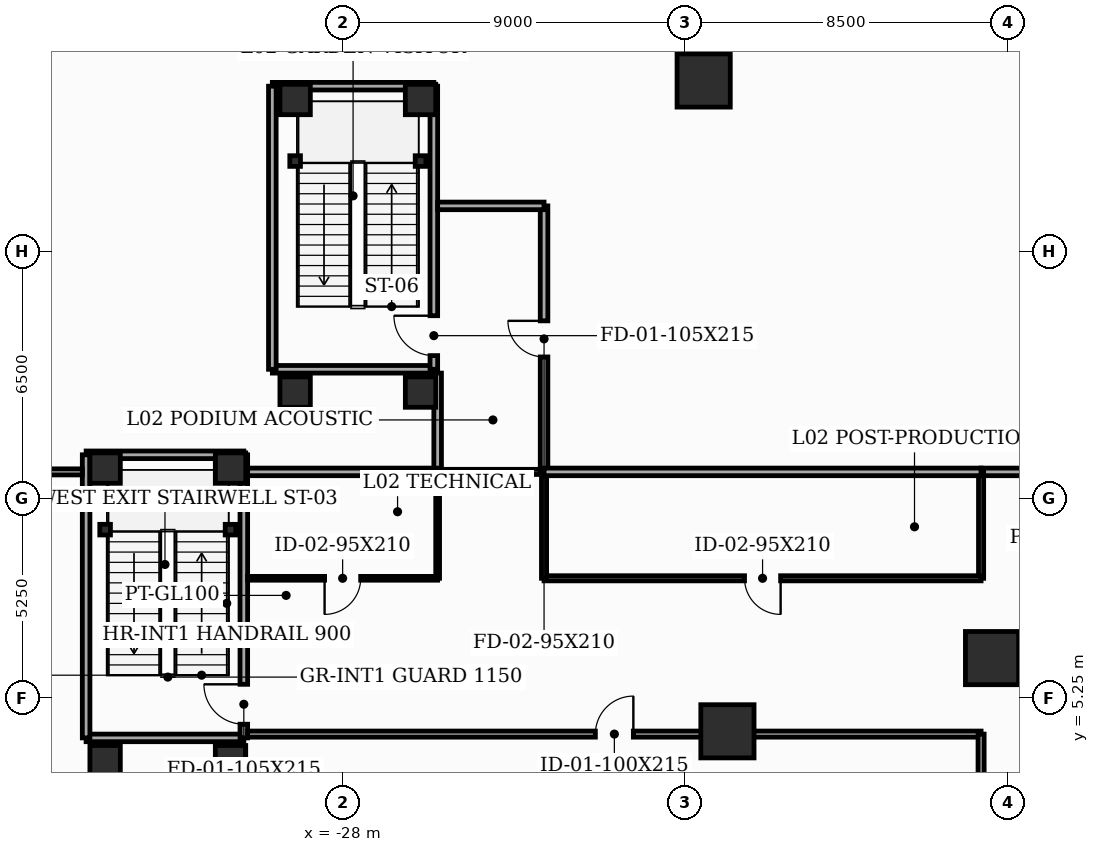
"""IFC4 building model, lengths in metres.
Left out: names, types, materials, properties, quantities, classifications, styles, units other than length and angle.
Written with IfcOpenShell. Run it as: python <this file> out.ifc"""

import sys

from ifc_helpers import new_model, si_unit, direction, frame, frame_2d, origin, origin_2d, place, context, subcontext, project, spatial, rectangle, i_section, extrude, element, fill, save


model = new_model("IFC4")
c1 = context("Model", 3, precision=1e-05, world=origin(), true_north=direction((0.0, 1.0)))
c2 = subcontext(c1, "Body", "Model", "MODEL_VIEW")
j1 = project(units=[si_unit("LENGTHUNIT", "METRE"), si_unit("PLANEANGLEUNIT", "RADIAN")], contexts=[c1])
p1 = place(None, origin())
s1 = spatial("IfcSite", under=j1, at=p1, CompositionType="ELEMENT")
p2 = place(p1, origin())
s2 = spatial("IfcBuilding", under=s1, at=p2, CompositionType="ELEMENT")
p3 = place(p2, frame((0.0, 0.0, 10.4)))
s3 = spatial("IfcBuildingStorey", under=s2, at=p3, CompositionType="ELEMENT", Elevation=10.4)
for number, where, z_axis, x_axis in (
    (1, (-10.912, 6.3, 0.0), (0.0, 0.0, 1.0), (1.0, 0.0, 0.0)),
    (2, (-18.5, 21.5, 0.0), (0.0, 0.0, 1.0), (1.0, 0.0, 0.0)),
    (3, (-17.875, 4.373, 0.0), (0.0, 0.0, 1.0), (1.0, 0.0, 0.0)),
):
    element("IfcColumn", number, at=place(p3, frame(where, z_axis=z_axis, x_axis=x_axis)), inside=s3, PredefinedType="COLUMN", context=c2, shape_type="SweptSolid", body=[
        extrude(rectangle(XDim=1.4, YDim=1.4, at=origin_2d()), origin(), (0.0, 0.0, 1.0), 5.2),
    ])
for number, where, z_axis, x_axis in (
    (4, (-34.25, 3.6, 0.0), (0.0, 0.0, 1.0), (1.0, 0.0, 0.0)),
    (5, (-30.95, 3.6, 0.0), (0.0, 0.0, 1.0), (1.0, 0.0, 0.0)),
    (6, (-30.95, 11.3, 0.0), (0.0, 0.0, 1.0), (1.0, 0.0, 0.0)),
    (7, (-34.25, 11.3, 0.0), (0.0, 0.0, 1.0), (1.0, 0.0, 0.0)),
):
    element("IfcColumn", number, at=place(p3, frame(where, z_axis=z_axis, x_axis=x_axis)), inside=s3, PredefinedType="COLUMN", context=c2, shape_type="SweptSolid", body=[
        extrude(rectangle(XDim=0.8, YDim=0.8, at=origin_2d()), origin(), (0.0, 0.0, 1.0), 5.2),
    ])
for number, where, z_axis, x_axis in (
    (8, (-34.25, 9.68, 0.0), (0.0, 0.0, 1.0), (1.0, 0.0, 0.0)),
    (9, (-30.95, 9.68, 0.0), (0.0, 0.0, 1.0), (1.0, 0.0, 0.0)),
):
    element("IfcColumn", number, at=place(p3, frame(where, z_axis=z_axis, x_axis=x_axis)), inside=s3, PredefinedType="PILASTER", context=c2, shape_type="SweptSolid", body=[
        extrude(i_section(OverallWidth=0.28, OverallDepth=0.28, WebThickness=0.01, FlangeThickness=0.018, at=origin_2d()), origin(), (0.0, 0.0, 1.0), 5.2),
    ])
for number, where, z_axis, x_axis in (
    (10, (-29.25, 13.3, 0.0), (0.0, 0.0, 1.0), (1.0, 0.0, 0.0)),
    (11, (-25.95, 13.3, 0.0), (0.0, 0.0, 1.0), (1.0, 0.0, 0.0)),
    (12, (-25.95, 21.0, 0.0), (0.0, 0.0, 1.0), (1.0, 0.0, 0.0)),
    (13, (-29.25, 21.0, 0.0), (0.0, 0.0, 1.0), (1.0, 0.0, 0.0)),
):
    element("IfcColumn", number, at=place(p3, frame(where, z_axis=z_axis, x_axis=x_axis)), inside=s3, PredefinedType="COLUMN", context=c2, shape_type="SweptSolid", body=[
        extrude(rectangle(XDim=0.8, YDim=0.8, at=origin_2d()), origin(), (0.0, 0.0, 1.0), 5.2),
    ])
for number, where, z_axis, x_axis in (
    (14, (-29.25, 19.38, 0.0), (0.0, 0.0, 1.0), (1.0, 0.0, 0.0)),
    (15, (-25.95, 19.38, 0.0), (0.0, 0.0, 1.0), (1.0, 0.0, 0.0)),
):
    element("IfcColumn", number, at=place(p3, frame(where, z_axis=z_axis, x_axis=x_axis)), inside=s3, PredefinedType="PILASTER", context=c2, shape_type="SweptSolid", body=[
        extrude(i_section(OverallWidth=0.28, OverallDepth=0.28, WebThickness=0.01, FlangeThickness=0.018, at=origin_2d()), origin(), (0.0, 0.0, 1.0), 5.2),
    ])
p4 = place(p3, frame((-34.75, 4.2, 0.0), z_axis=(0.0, 0.0, 1.0), x_axis=(1.0, 0.0, 0.0)))
e16 = element("IfcWall", 16, at=p4, inside=s3, PredefinedType="SOLIDWALL", context=c2, shape_type="SweptSolid", body=[
    extrude(rectangle(XDim=4.15, YDim=0.2, at=frame_2d((2.075, 0.0))), origin(), (0.0, 0.0, 1.0), 4.95),
])
p5 = place(p3, frame((-30.6, 4.2, 0.0), z_axis=(0.0, 0.0, 1.0), x_axis=(0.0, 1.0, 0.0)))
e17 = element("IfcWall", 17, at=p5, inside=s3, PredefinedType="SOLIDWALL", context=c2, shape_type="SweptSolid", body=[
    extrude(rectangle(XDim=7.45, YDim=0.2, at=frame_2d((3.725, 0.0))), origin(), (0.0, 0.0, 1.0), 4.95),
])
p6 = place(p5, frame((0.36, 0.0, 0.0)))
e18 = element("IfcOpeningElement", 18, at=p6, cuts=e17, PredefinedType="OPENING", context=c2, shape_type="SweptSolid", body=[
    extrude(rectangle(XDim=1.05, YDim=2.15, at=frame_2d((0.525, 1.075))), frame((0.0, 0.11, 0.0), z_axis=(0.0, -1.0, 0.0), x_axis=(1.0, 0.0, 0.0)), (0.0, 0.0, 1.0), 0.22),
])
p7 = place(p3, frame((-30.6, 11.65, 0.0), z_axis=(0.0, 0.0, 1.0), x_axis=(-1.0, 0.0, 0.0)))
e19 = element("IfcWall", 19, at=p7, inside=s3, PredefinedType="SOLIDWALL", context=c2, shape_type="SweptSolid", body=[
    extrude(rectangle(XDim=4.15, YDim=0.2, at=frame_2d((2.075, 0.0))), origin(), (0.0, 0.0, 1.0), 4.95),
])
p8 = place(p3, frame((-34.75, 11.65, 0.0), z_axis=(0.0, 0.0, 1.0), x_axis=(0.0, -1.0, 0.0)))
e20 = element("IfcWall", 20, at=p8, inside=s3, PredefinedType="SOLIDWALL", context=c2, shape_type="SweptSolid", body=[
    extrude(rectangle(XDim=7.45, YDim=0.2, at=frame_2d((3.725, 0.0))), origin(), (0.0, 0.0, 1.0), 4.95),
])
p9 = place(p3, frame((-29.85, 13.9, 0.0), z_axis=(0.0, 0.0, 1.0), x_axis=(1.0, 0.0, 0.0)))
e21 = element("IfcWall", 21, at=p9, inside=s3, PredefinedType="SOLIDWALL", context=c2, shape_type="SweptSolid", body=[
    extrude(rectangle(XDim=4.25, YDim=0.2, at=frame_2d((2.125, 0.0))), origin(), (0.0, 0.0, 1.0), 4.435),
])
p10 = place(p3, frame((-25.6, 13.9, 0.0), z_axis=(0.0, 0.0, 1.0), x_axis=(0.0, 1.0, 0.0)))
e22 = element("IfcWall", 22, at=p10, inside=s3, PredefinedType="SOLIDWALL", context=c2, shape_type="SweptSolid", body=[
    extrude(rectangle(XDim=7.45, YDim=0.2, at=frame_2d((3.725, 0.0))), origin(), (0.0, 0.0, 1.0), 4.435),
])
p11 = place(p10, frame((0.36, 0.0, 0.0)))
e23 = element("IfcOpeningElement", 23, at=p11, cuts=e22, PredefinedType="OPENING", context=c2, shape_type="SweptSolid", body=[
    extrude(rectangle(XDim=1.05, YDim=2.15, at=frame_2d((0.525, 1.075))), frame((0.0, 0.11, 0.0), z_axis=(0.0, -1.0, 0.0), x_axis=(1.0, 0.0, 0.0)), (0.0, 0.0, 1.0), 0.22),
])
p12 = place(p3, frame((-25.6, 21.35, 0.0), z_axis=(0.0, 0.0, 1.0), x_axis=(-1.0, 0.0, 0.0)))
e24 = element("IfcWall", 24, at=p12, inside=s3, PredefinedType="SOLIDWALL", context=c2, shape_type="SweptSolid", body=[
    extrude(rectangle(XDim=4.25, YDim=0.2, at=frame_2d((2.125, 0.0))), origin(), (0.0, 0.0, 1.0), 4.95),
])
p13 = place(p3, frame((-29.85, 21.35, 0.0), z_axis=(0.0, 0.0, 1.0), x_axis=(0.0, -1.0, 0.0)))
e25 = element("IfcWall", 25, at=p13, inside=s3, PredefinedType="SOLIDWALL", context=c2, shape_type="SweptSolid", body=[
    extrude(rectangle(XDim=7.45, YDim=0.2, at=frame_2d((3.725, 0.0))), origin(), (0.0, 0.0, 1.0), 4.435),
])
p14 = place(p3, frame((-22.7, 11.2, 0.0), z_axis=(0.0, 0.0, 1.0), x_axis=(-1.0, 0.0, 0.0)))
e26 = element("IfcWall", 26, at=p14, inside=s3, PredefinedType="PARTITIONING", context=c2, shape_type="SweptSolid", body=[
    extrude(rectangle(XDim=2.8, YDim=0.135, at=frame_2d((1.4, 0.0))), origin(), (0.0, 0.0, 1.0), 4.95),
])
p15 = place(p3, frame((-30.5, 4.3, 0.0), z_axis=(0.0, 0.0, 1.0), x_axis=(1.0, 0.0, 0.0)))
e27 = element("IfcWall", 27, at=p15, inside=s3, PredefinedType="PARTITIONING", context=c2, shape_type="SweptSolid", body=[
    extrude(rectangle(XDim=19.3, YDim=0.16, at=frame_2d((9.65, 0.0))), origin(), (0.0, 0.0, 1.0), 3.435),
])
p16 = place(p15, frame((9.15, 0.0, 0.0)))
e28 = element("IfcOpeningElement", 28, at=p16, cuts=e27, PredefinedType="OPENING", context=c2, shape_type="SweptSolid", body=[
    extrude(rectangle(XDim=1.0, YDim=2.15, at=frame_2d((0.5, 1.075))), frame((0.0, 0.09, 0.0), z_axis=(0.0, -1.0, 0.0), x_axis=(1.0, 0.0, 0.0)), (0.0, 0.0, 1.0), 0.18),
])
p17 = place(p3, frame((-11.2, 4.3, 0.0), z_axis=(0.0, 0.0, 1.0), x_axis=(0.0, -1.0, 0.0)))
e29 = element("IfcWall", 29, at=p17, inside=s3, PredefinedType="PARTITIONING", context=c2, shape_type="SweptSolid", body=[
    extrude(rectangle(XDim=7.9, YDim=0.16, at=frame_2d((3.95, 0.0))), origin(), (0.0, 0.0, 1.0), 4.235),
])
p18 = place(p3, frame((-9.0, 11.2, 0.0), z_axis=(0.0, 0.0, 1.0), x_axis=(-1.0, 0.0, 0.0)))
e30 = element("IfcWall", 30, at=p18, inside=s3, PredefinedType="SOLIDWALL", context=c2, shape_type="SweptSolid", body=[
    extrude(rectangle(XDim=2.2, YDim=0.2, at=frame_2d((1.1, 0.0))), origin(), (0.0, 0.0, 1.0), 4.95),
])
p19 = place(p3, frame((-11.2, 11.2, 0.0), z_axis=(0.0, 0.0, 1.0), x_axis=(0.0, -1.0, 0.0)))
e31 = element("IfcWall", 31, at=p19, inside=s3, PredefinedType="PARTITIONING", context=c2, shape_type="SweptSolid", body=[
    extrude(rectangle(XDim=2.8, YDim=0.135, at=frame_2d((1.4, 0.0))), origin(), (0.0, 0.0, 1.0), 4.95),
])
p20 = place(p3, frame((-11.2, 8.4, 0.0), z_axis=(0.0, 0.0, 1.0), x_axis=(-1.0, 0.0, 0.0)))
e32 = element("IfcWall", 32, at=p20, inside=s3, PredefinedType="PARTITIONING", context=c2, shape_type="SweptSolid", body=[
    extrude(rectangle(XDim=11.5, YDim=0.135, at=frame_2d((5.75, 0.0))), origin(), (0.0, 0.0, 1.0), 4.235),
])
p21 = place(p20, frame((5.275, 0.0, 0.0)))
e33 = element("IfcOpeningElement", 33, at=p21, cuts=e32, PredefinedType="OPENING", context=c2, shape_type="SweptSolid", body=[
    extrude(rectangle(XDim=0.95, YDim=2.1, at=frame_2d((0.475, 1.05))), frame((0.0, 0.077, 0.0), z_axis=(0.0, -1.0, 0.0), x_axis=(1.0, 0.0, 0.0)), (0.0, 0.0, 1.0), 0.155),
])
p22 = place(p3, frame((-22.7, 8.4, 0.0), z_axis=(0.0, 0.0, 1.0), x_axis=(0.0, 1.0, 0.0)))
e34 = element("IfcWall", 34, at=p22, inside=s3, PredefinedType="PARTITIONING", context=c2, shape_type="SweptSolid", body=[
    extrude(rectangle(XDim=2.8, YDim=0.135, at=frame_2d((1.4, 0.0))), origin(), (0.0, 0.0, 1.0), 4.95),
])
p23 = place(p3, frame((-25.5, 11.2, 0.0), z_axis=(0.0, 0.0, 1.0), x_axis=(0.0, -1.0, 0.0)))
e35 = element("IfcWall", 35, at=p23, inside=s3, PredefinedType="MOVABLE", context=c2, shape_type="SweptSolid", body=[
    extrude(rectangle(XDim=2.8, YDim=0.1, at=frame_2d((1.4, 0.0))), origin(), (0.0, 0.0, 1.0), 4.95),
])
p24 = place(p3, frame((-25.5, 8.4, 0.0), z_axis=(0.0, 0.0, 1.0), x_axis=(-1.0, 0.0, 0.0)))
e36 = element("IfcWall", 36, at=p24, inside=s3, PredefinedType="MOVABLE", context=c2, shape_type="SweptSolid", body=[
    extrude(rectangle(XDim=5.0, YDim=0.1, at=frame_2d((2.5, 0.0))), origin(), (0.0, 0.0, 1.0), 4.95),
])
p25 = place(p24, frame((2.025, 0.0, 0.0)))
e37 = element("IfcOpeningElement", 37, at=p25, cuts=e36, PredefinedType="OPENING", context=c2, shape_type="SweptSolid", body=[
    extrude(rectangle(XDim=0.95, YDim=2.1, at=frame_2d((0.475, 1.05))), frame((0.0, 0.06, 0.0), z_axis=(0.0, -1.0, 0.0), x_axis=(1.0, 0.0, 0.0)), (0.0, 0.0, 1.0), 0.12),
])
p26 = place(p3, frame((-25.5, 13.8, 0.0), z_axis=(0.0, 0.0, 1.0), x_axis=(0.0, -1.0, 0.0)))
e38 = element("IfcWall", 38, at=p26, inside=s3, PredefinedType="SOLIDWALL", context=c2, shape_type="SweptSolid", body=[
    extrude(rectangle(XDim=2.6, YDim=0.2, at=frame_2d((1.3, 0.0))), origin(), (0.0, 0.0, 1.0), 4.435),
])
p27 = place(p3, frame((-22.7, 11.2, 0.0), z_axis=(0.0, 0.0, 1.0), x_axis=(0.0, 1.0, 0.0)))
e39 = element("IfcWall", 39, at=p27, inside=s3, PredefinedType="SOLIDWALL", context=c2, shape_type="SweptSolid", body=[
    extrude(rectangle(XDim=7.0, YDim=0.2, at=frame_2d((3.5, 0.0))), origin(), (0.0, 0.0, 1.0), 4.435),
])
p28 = place(p27, frame((3.025, 0.0, 0.0)))
e40 = element("IfcOpeningElement", 40, at=p28, cuts=e39, PredefinedType="OPENING", context=c2, shape_type="SweptSolid", body=[
    extrude(rectangle(XDim=0.95, YDim=2.1, at=frame_2d((0.475, 1.05))), frame((0.0, 0.11, 0.0), z_axis=(0.0, -1.0, 0.0), x_axis=(1.0, 0.0, 0.0)), (0.0, 0.0, 1.0), 0.22),
])
p29 = place(p3, frame((-22.7, 18.2, 0.0), z_axis=(0.0, 0.0, 1.0), x_axis=(-1.0, 0.0, 0.0)))
e41 = element("IfcWall", 41, at=p29, inside=s3, PredefinedType="SOLIDWALL", context=c2, shape_type="SweptSolid", body=[
    extrude(rectangle(XDim=2.8, YDim=0.2, at=frame_2d((1.4, 0.0))), origin(), (0.0, 0.0, 1.0), 4.95),
])
p30 = place(p3, frame((-34.85, 11.2, 0.0), z_axis=(0.0, 0.0, 1.0), x_axis=(-1.0, 0.0, 0.0)))
e42 = element("IfcWall", 42, at=p30, inside=s3, PredefinedType="PARTITIONING", context=c2, shape_type="SweptSolid", body=[
    extrude(rectangle(XDim=2.07, YDim=0.16, at=frame_2d((1.035, 0.0))), origin(), (0.0, 0.0, 1.0), 4.235),
])
p31 = place(p3, frame((-22.7, 11.2, 0.0), z_axis=(0.0, 0.0, 1.0), x_axis=(1.0, 0.0, 0.0)))
e43 = element("IfcWall", 43, at=p31, inside=s3, PredefinedType="SOLIDWALL", context=c2, shape_type="SweptSolid", body=[
    extrude(rectangle(XDim=11.5, YDim=0.2, at=frame_2d((5.75, 0.0))), origin(), (0.0, 0.0, 1.0), 4.235),
])
p32 = place(p3, frame((-30.5, 11.2, 0.0), z_axis=(0.0, 0.0, 1.0), x_axis=(1.0, 0.0, 0.0)))
e44 = element("IfcWall", 44, at=p32, inside=s3, PredefinedType="SOLIDWALL", context=c2, shape_type="SweptSolid", body=[
    extrude(rectangle(XDim=5.0, YDim=0.2, at=frame_2d((2.5, 0.0))), origin(), (0.0, 0.0, 1.0), 4.95),
])
p33 = place(p6, origin())
e45 = element("IfcDoor", 45, at=p33, inside=s3, OperationType="SINGLE_SWING_RIGHT", PredefinedType="DOOR", context=c2, shape_type="SweptSolid", body=[
    extrude(rectangle(XDim=1.05, YDim=2.15, at=frame_2d((0.525, 1.075))), frame((0.0, 0.025, 0.0), z_axis=(0.0, -1.0, 0.0), x_axis=(1.0, 0.0, 0.0)), (0.0, 0.0, 1.0), 0.05),
])
fill(e18, e45)
p34 = place(p11, origin())
e46 = element("IfcDoor", 46, at=p34, inside=s3, OperationType="SINGLE_SWING_RIGHT", PredefinedType="DOOR", context=c2, shape_type="SweptSolid", body=[
    extrude(rectangle(XDim=1.05, YDim=2.15, at=frame_2d((0.525, 1.075))), frame((0.0, 0.025, 0.0), z_axis=(0.0, -1.0, 0.0), x_axis=(1.0, 0.0, 0.0)), (0.0, 0.0, 1.0), 0.05),
])
fill(e23, e46)
p35 = place(p16, origin())
e47 = element("IfcDoor", 47, at=p35, inside=s3, OperationType="SINGLE_SWING_RIGHT", PredefinedType="DOOR", context=c2, shape_type="SweptSolid", body=[
    extrude(rectangle(XDim=1.0, YDim=2.15, at=frame_2d((0.5, 1.075))), frame((0.0, 0.025, 0.0), z_axis=(0.0, -1.0, 0.0), x_axis=(1.0, 0.0, 0.0)), (0.0, 0.0, 1.0), 0.05),
])
fill(e28, e47)
p36 = place(p21, origin())
e48 = element("IfcDoor", 48, at=p36, inside=s3, OperationType="SINGLE_SWING_LEFT", PredefinedType="DOOR", context=c2, shape_type="SweptSolid", body=[
    extrude(rectangle(XDim=0.95, YDim=2.1, at=frame_2d((0.475, 1.05))), frame((0.0, 0.025, 0.0), z_axis=(0.0, -1.0, 0.0), x_axis=(1.0, 0.0, 0.0)), (0.0, 0.0, 1.0), 0.05),
])
fill(e33, e48)
p37 = place(p25, origin())
e49 = element("IfcDoor", 49, at=p37, inside=s3, OperationType="SINGLE_SWING_RIGHT", PredefinedType="DOOR", context=c2, shape_type="SweptSolid", body=[
    extrude(rectangle(XDim=0.95, YDim=2.1, at=frame_2d((0.475, 1.05))), frame((0.0, 0.025, 0.0), z_axis=(0.0, -1.0, 0.0), x_axis=(1.0, 0.0, 0.0)), (0.0, 0.0, 1.0), 0.05),
])
fill(e37, e49)
p38 = place(p28, origin())
e50 = element("IfcDoor", 50, at=p38, inside=s3, OperationType="SINGLE_SWING_RIGHT", PredefinedType="DOOR", context=c2, shape_type="SweptSolid", body=[
    extrude(rectangle(XDim=0.95, YDim=2.1, at=frame_2d((0.475, 1.05))), frame((0.0, 0.025, 0.0), z_axis=(0.0, -1.0, 0.0), x_axis=(1.0, 0.0, 0.0)), (0.0, 0.0, 1.0), 0.05),
])
fill(e40, e50)
save(model, sys.argv[1])
